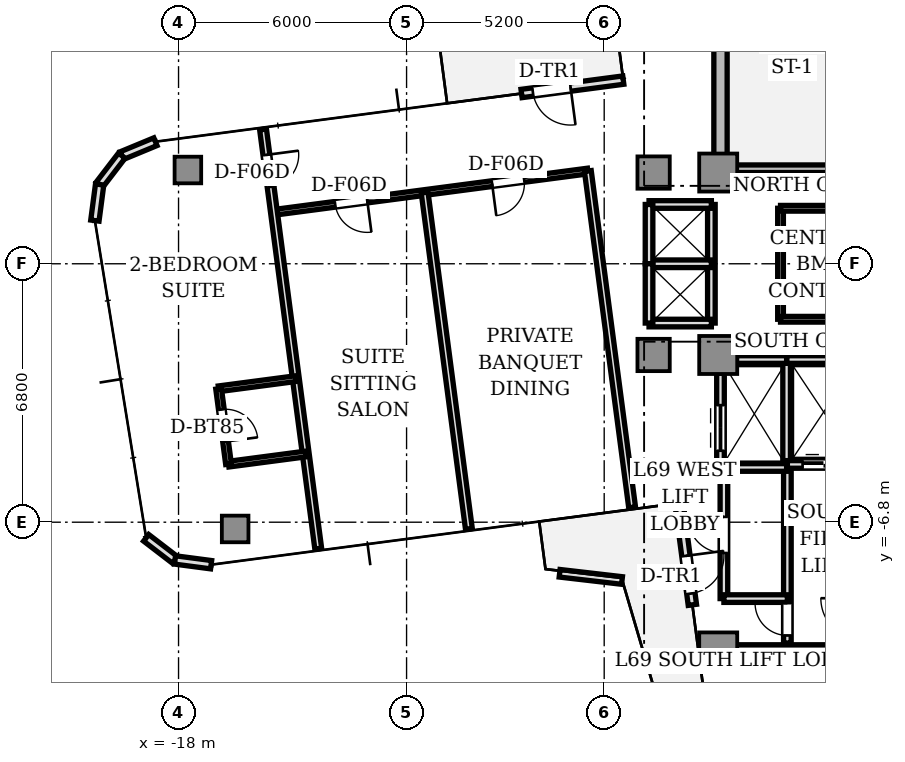
"""IFC4 building model, lengths in metres.
Left out: names, types, materials, properties, quantities, classifications, styles, units other than length and angle.
Written with IfcOpenShell. Run it as: python <this file> out.ifc"""

import sys

from ifc_helpers import new_model, si_unit, direction, frame, frame_2d, origin, origin_2d, place, context, subcontext, project, spatial, rectangle, extrude, source, transform, mapped, element, fill, save


model = new_model("IFC4")
c1 = context("Model", 3, precision=1e-05, world=origin(), true_north=direction((0.0, 1.0)))
c2 = subcontext(c1, "Body", "Model", "MODEL_VIEW")
j1 = project(units=[si_unit("LENGTHUNIT", "METRE"), si_unit("PLANEANGLEUNIT", "RADIAN")], contexts=[c1])
p1 = place(None, origin())
s1 = spatial("IfcSite", under=j1, at=p1, CompositionType="ELEMENT")
p2 = place(p1, origin())
s2 = spatial("IfcBuilding", under=s1, at=p2, CompositionType="ELEMENT")
p3 = place(p2, frame((0.0, 0.0, 247.85)))
s3 = spatial("IfcBuildingStorey", under=s2, at=p3, CompositionType="ELEMENT", Elevation=247.85)
p4 = place(p3, frame((-3.74, 2.85, 0.0), z_axis=(0.0, 0.0, 1.0), x_axis=(0.0, 1.0, 0.0)))
e1 = element("IfcWall", 1, at=p4, inside=s3, PredefinedType="SHEAR", context=c2, shape_type="SweptSolid", body=[
    extrude(rectangle(XDim=6.9, YDim=0.35, at=frame_2d((3.45, 0.0))), origin(), (0.0, 0.0, 1.0), 3.11),
])
p5 = place(p3, frame((-3.55, -10.2, 0.0), z_axis=(0.0, 0.0, 1.0), x_axis=(1.0, 0.0, 0.0)))
e2 = element("IfcWall", 2, at=p5, inside=s3, PredefinedType="SHEAR", context=c2, shape_type="SweptSolid", body=[
    extrude(rectangle(XDim=7.1, YDim=0.35, at=frame_2d((3.55, 0.0))), origin(), (0.0, 0.0, 1.0), 3.11),
])
m1 = source(origin(), c2, "Body", "SweptSolid", [
    extrude(rectangle(XDim=1.0, YDim=1.0, at=origin_2d()), origin(), (0.0, 0.0, 1.0), 3.11),
])
for number, where, z_axis, x_axis in (
    (3, (-3.8, 2.4, 0.0), (0.0, 0.0, 1.0), (1.0, 0.0, 0.0)),
    (4, (-3.8, -2.4, 0.0), (0.0, 0.0, 1.0), (1.0, 0.0, 0.0)),
    (5, (-3.8, -10.2, 0.0), (0.0, 0.0, 1.0), (1.0, 0.0, 0.0)),
):
    element("IfcColumn", number, at=place(p3, frame(where, z_axis=z_axis, x_axis=x_axis)), inside=s3, PredefinedType="COLUMN", context=c2, shape_type="MappedRepresentation", body=[
        mapped(m1, transform((0.0, 0.0, 0.0), scale=1.0)),
    ])
m2 = source(origin(), c2, "Body", "SweptSolid", [
    extrude(rectangle(XDim=0.85, YDim=0.85, at=origin_2d()), origin(), (0.0, 0.0, 1.0), 3.11),
])
for number, where, z_axis, x_axis in (
    (6, (-5.5, 2.4, 0.0), (0.0, 0.0, 1.0), (1.0, 0.0, 0.0)),
    (7, (-5.5, -2.4, 0.0), (0.0, 0.0, 1.0), (1.0, 0.0, 0.0)),
):
    element("IfcColumn", number, at=place(p3, frame(where, z_axis=z_axis, x_axis=x_axis)), inside=s3, PredefinedType="COLUMN", context=c2, shape_type="MappedRepresentation", body=[
        mapped(m2, transform((0.0, 0.0, 0.0), scale=1.0)),
    ])
m3 = source(origin(), c2, "Body", "SweptSolid", [
    extrude(rectangle(XDim=0.7, YDim=0.7, at=origin_2d()), origin(), (0.0, 0.0, 1.0), 3.11),
])
for number, where, z_axis, x_axis in (
    (8, (-17.754, 2.467, 0.0), (0.0, 0.0, 1.0), (1.0, 0.0, 0.0)),
    (9, (-16.51, -6.978, 0.0), (0.0, 0.0, 1.0), (1.0, 0.0, 0.0)),
):
    element("IfcColumn", number, at=place(p3, frame(where, z_axis=z_axis, x_axis=x_axis)), inside=s3, PredefinedType="COLUMN", context=c2, shape_type="MappedRepresentation", body=[
        mapped(m3, transform((0.0, 0.0, 0.0), scale=1.0)),
    ])
p6 = place(p3, frame((-6.298, 4.832, 0.0), z_axis=(0.0, 0.0, 1.0), x_axis=(-0.991451525486, -0.130475563272, 0.0)))
e10 = element("IfcWall", 10, at=p6, inside=s3, PredefinedType="STANDARD", context=c2, shape_type="SweptSolid", body=[
    extrude(rectangle(XDim=2.7, YDim=0.22, at=frame_2d((1.35, 0.0))), origin(), (0.0, 0.0, 1.0), 3.11),
])
p7 = place(p6, frame((1.4, 0.0, 0.0)))
e11 = element("IfcOpeningElement", 11, at=p7, cuts=e10, PredefinedType="OPENING", context=c2, shape_type="SweptSolid", body=[
    extrude(rectangle(XDim=1.0, YDim=2.2, at=frame_2d((0.5, 1.1))), frame((0.0, 0.12, 0.0), z_axis=(0.0, -1.0, 0.0), x_axis=(1.0, 0.0, 0.0)), (0.0, 0.0, 1.0), 0.24),
])
for number, where, z_axis, x_axis in (
    (12, (-18.608, 3.212, 0.0), (0.0, 0.0, 1.0), (-0.924, -0.383, 0.0)),
    (13, (-19.493, 2.845, 0.0), (0.0, 0.0, 1.0), (-0.609, -0.793, 0.0)),
    (14, (-20.076, 2.085, 0.0), (0.0, 0.0, 1.0), (-0.131, -0.991, 0.0)),
    (15, (-18.852, -7.21, 0.0), (0.0, 0.0, 1.0), (0.793, -0.609, 0.0)),
    (16, (-18.093, -7.793, 0.0), (0.0, 0.0, 1.0), (0.991, -0.131, 0.0)),
):
    element("IfcWall", number, at=place(p3, frame(where, z_axis=z_axis, x_axis=x_axis)), inside=s3, PredefinedType="STANDARD", context=c2, shape_type="SweptSolid", body=[
        extrude(rectangle(XDim=0.958, YDim=0.22, at=frame_2d((0.479, 0.0))), origin(), (0.0, 0.0, 1.0), 3.11),
    ])
p8 = place(p3, frame((-4.832, -6.298, 0.0), z_axis=(0.0, 0.0, 1.0), x_axis=(0.130475563272, -0.991451525486, 0.0)))
e17 = element("IfcWall", 17, at=p8, inside=s3, PredefinedType="STANDARD", context=c2, shape_type="SweptSolid", body=[
    extrude(rectangle(XDim=2.7, YDim=0.22, at=frame_2d((1.35, 0.0))), origin(), (0.0, 0.0, 1.0), 3.11),
])
p9 = place(p8, frame((1.4, 0.0, 0.0)))
e18 = element("IfcOpeningElement", 18, at=p9, cuts=e17, PredefinedType="OPENING", context=c2, shape_type="SweptSolid", body=[
    extrude(rectangle(XDim=1.0, YDim=2.2, at=frame_2d((0.5, 1.1))), frame((0.0, 0.12, 0.0), z_axis=(0.0, -1.0, 0.0), x_axis=(1.0, 0.0, 0.0)), (0.0, 0.0, 1.0), 0.24),
])
p10 = place(p3, frame((-7.973, -8.144, 0.0), z_axis=(0.0, 0.0, 1.0), x_axis=(0.993336913932, -0.115246585284, 0.0)))
e19 = element("IfcWall", 19, at=p10, inside=s3, PredefinedType="PARAPET", context=c2, shape_type="SweptSolid", body=[
    extrude(rectangle(XDim=1.652, YDim=0.2, at=frame_2d((0.826, 0.0))), origin(), (0.0, 0.0, 1.0), 0.65),
])
p11 = place(p3, frame((-3.72, 2.5, 0.0), z_axis=(0.0, 0.0, 1.0), x_axis=(1.0, 0.0, 0.0)))
e20 = element("IfcWall", 20, at=p11, inside=s3, PredefinedType="SOLIDWALL", context=c2, shape_type="SweptSolid", body=[
    extrude(rectangle(XDim=3.72, YDim=0.2, at=frame_2d((1.86, 0.0))), origin(), (0.0, 0.0, 1.0), 3.11),
])
p12 = place(p3, frame((-1.98, -9.98, 0.0), z_axis=(0.0, 0.0, 1.0), x_axis=(0.0, 1.0, 0.0)))
e21 = element("IfcWall", 21, at=p12, inside=s3, PredefinedType="SOLIDWALL", context=c2, shape_type="SweptSolid", body=[
    extrude(rectangle(XDim=4.66, YDim=0.2, at=frame_2d((2.33, 0.0))), origin(), (0.0, 0.0, 1.0), 2.66),
])
p13 = place(p12, frame((0.2, 0.0, 0.0)))
e22 = element("IfcOpeningElement", 22, at=p13, cuts=e21, PredefinedType="OPENING", context=c2, shape_type="SweptSolid", body=[
    extrude(rectangle(XDim=0.85, YDim=2.1, at=frame_2d((0.425, 1.05))), frame((0.0, 0.11, 0.0), z_axis=(0.0, -1.0, 0.0), x_axis=(1.0, 0.0, 0.0)), (0.0, 0.0, 1.0), 0.22),
])
p14 = place(p3, frame((-2.0, -5.28, 0.0), z_axis=(0.0, 0.0, 1.0), x_axis=(0.0, 1.0, 0.0)))
e23 = element("IfcWall", 23, at=p14, inside=s3, PredefinedType="SOLIDWALL", context=c2, shape_type="SweptSolid", body=[
    extrude(rectangle(XDim=2.78, YDim=0.2, at=frame_2d((1.39, 0.0))), origin(), (0.0, 0.0, 1.0), 2.66),
])
p15 = place(p3, frame((-2.0, -2.52, 0.0), z_axis=(0.0, 0.0, 1.0), x_axis=(1.0, 0.0, 0.0)))
e24 = element("IfcWall", 24, at=p15, inside=s3, PredefinedType="SOLIDWALL", context=c2, shape_type="SweptSolid", body=[
    extrude(rectangle(XDim=1.95, YDim=0.2, at=frame_2d((0.975, 0.0))), origin(), (0.0, 0.0, 1.0), 2.66),
])
p16 = place(p3, frame((-1.98, -5.28, 0.0), z_axis=(0.0, 0.0, 1.0), x_axis=(1.0, 0.0, 0.0)))
e25 = element("IfcWall", 25, at=p16, inside=s3, PredefinedType="SOLIDWALL", context=c2, shape_type="SweptSolid", body=[
    extrude(rectangle(XDim=1.93, YDim=0.2, at=frame_2d((0.965, 0.0))), origin(), (0.0, 0.0, 1.0), 2.66),
])
p17 = place(p16, frame((0.4, 0.0, 0.0)))
e26 = element("IfcOpeningElement", 26, at=p17, cuts=e25, PredefinedType="OPENING", context=c2, shape_type="SweptSolid", body=[
    extrude(rectangle(XDim=1.1, YDim=2.2, at=frame_2d((0.55, 1.1))), frame((0.0, 0.11, 0.0), z_axis=(0.0, -1.0, 0.0), x_axis=(1.0, 0.0, 0.0)), (0.0, 0.0, 1.0), 0.22),
])
p18 = place(p3, frame((-3.32, -2.52, 0.0), z_axis=(0.0, 0.0, 1.0), x_axis=(1.0, 0.0, 0.0)))
e27 = element("IfcWall", 27, at=p18, inside=s3, PredefinedType="SOLIDWALL", context=c2, shape_type="SweptSolid", body=[
    extrude(rectangle(XDim=1.32, YDim=0.2, at=frame_2d((0.66, 0.0))), origin(), (0.0, 0.0, 1.0), 2.66),
])
p19 = place(p3, frame((-3.74, -5.36, 0.0), z_axis=(0.0, 0.0, 1.0), x_axis=(1.0, 0.0, 0.0)))
e28 = element("IfcWall", 28, at=p19, inside=s3, PredefinedType="SOLIDWALL", context=c2, shape_type="SweptSolid", body=[
    extrude(rectangle(XDim=1.74, YDim=0.2, at=frame_2d((0.87, 0.0))), origin(), (0.0, 0.0, 1.0), 2.66),
])
p20 = place(p3, frame((-3.74, -5.36, 0.0), z_axis=(0.0, 0.0, 1.0), x_axis=(0.0, 1.0, 0.0)))
e29 = element("IfcWall", 29, at=p20, inside=s3, PredefinedType="SOLIDWALL", context=c2, shape_type="SweptSolid", body=[
    extrude(rectangle(XDim=2.48, YDim=0.2, at=frame_2d((1.24, 0.0))), origin(), (0.0, 0.0, 1.0), 2.66),
])
p21 = place(p20, frame((0.44, 0.0, 0.0)))
e30 = element("IfcOpeningElement", 30, at=p21, cuts=e29, PredefinedType="OPENING", context=c2, shape_type="SweptSolid", body=[
    extrude(rectangle(XDim=1.2, YDim=2.2, at=frame_2d((0.6, 1.1))), frame((0.0, 0.11, 0.0), z_axis=(0.0, -1.0, 0.0), x_axis=(1.0, 0.0, 0.0)), (0.0, 0.0, 1.0), 0.22),
])
p22 = place(p3, frame((-3.98, -1.56, 0.0), z_axis=(0.0, 0.0, 1.0), x_axis=(0.0, 1.0, 0.0)))
e31 = element("IfcWall", 31, at=p22, inside=s3, PredefinedType="SOLIDWALL", context=c2, shape_type="SweptSolid", body=[
    extrude(rectangle(XDim=3.12, YDim=0.2, at=frame_2d((1.56, 0.0))), origin(), (0.0, 0.0, 1.0), 2.33),
])
for number, where, z_axis, x_axis in (
    (32, (-5.62, 1.56, 0.0), (0.0, 0.0, 1.0), (1.0, 0.0, 0.0)),
    (33, (-5.62, -1.56, 0.0), (0.0, 0.0, 1.0), (1.0, 0.0, 0.0)),
    (34, (-5.62, 0.0, 0.0), (0.0, 0.0, 1.0), (1.0, 0.0, 0.0)),
):
    element("IfcWall", number, at=place(p3, frame(where, z_axis=z_axis, x_axis=x_axis)), inside=s3, PredefinedType="SOLIDWALL", context=c2, shape_type="SweptSolid", body=[
        extrude(rectangle(XDim=1.64, YDim=0.2, at=frame_2d((0.82, 0.0))), origin(), (0.0, 0.0, 1.0), 2.66),
    ])
for number, where, z_axis, x_axis in (
    (35, (-5.62, 0.0, 0.0), (0.0, 0.0, 1.0), (0.0, 1.0, 0.0)),
    (36, (-5.62, -1.56, 0.0), (0.0, 0.0, 1.0), (0.0, 1.0, 0.0)),
):
    element("IfcWall", number, at=place(p3, frame(where, z_axis=z_axis, x_axis=x_axis)), inside=s3, PredefinedType="SOLIDWALL", context=c2, shape_type="SweptSolid", body=[
        extrude(rectangle(XDim=1.56, YDim=0.2, at=frame_2d((0.78, 0.0))), origin(), (0.0, 0.0, 1.0), 2.66),
    ])
p23 = place(p3, frame((-3.65, -8.81, 0.0), z_axis=(0.0, 0.0, 1.0), x_axis=(0.0, 1.0, 0.0)))
e37 = element("IfcWall", 37, at=p23, inside=s3, PredefinedType="SOLIDWALL", context=c2, shape_type="SweptSolid", body=[
    extrude(rectangle(XDim=3.43, YDim=0.2, at=frame_2d((1.715, 0.0))), origin(), (0.0, 0.0, 1.0), 2.66),
])
p24 = place(p23, frame((1.2, 0.0, 0.0)))
e38 = element("IfcOpeningElement", 38, at=p24, cuts=e37, PredefinedType="OPENING", context=c2, shape_type="SweptSolid", body=[
    extrude(rectangle(XDim=0.95, YDim=2.15, at=frame_2d((0.475, 1.075))), frame((0.0, 0.11, 0.0), z_axis=(0.0, -1.0, 0.0), x_axis=(1.0, 0.0, 0.0)), (0.0, 0.0, 1.0), 0.22),
])
p25 = place(p3, frame((-3.65, -8.81, 0.0), z_axis=(0.0, 0.0, 1.0), x_axis=(1.0, 0.0, 0.0)))
e39 = element("IfcWall", 39, at=p25, inside=s3, PredefinedType="SOLIDWALL", context=c2, shape_type="SweptSolid", body=[
    extrude(rectangle(XDim=1.67, YDim=0.2, at=frame_2d((0.835, 0.0))), origin(), (0.0, 0.0, 1.0), 2.66),
])
p26 = place(p3, frame((-2.16, -1.46, 0.0), z_axis=(0.0, 0.0, 1.0), x_axis=(0.0, 1.0, 0.0)))
e40 = element("IfcWall", 40, at=p26, inside=s3, PredefinedType="PARTITIONING", context=c2, shape_type="SweptSolid", body=[
    extrude(rectangle(XDim=2.92, YDim=0.15, at=frame_2d((1.46, 0.0))), origin(), (0.0, 0.0, 1.0), 2.66),
])
p27 = place(p3, frame((-2.16, 1.46, 0.0), z_axis=(0.0, 0.0, 1.0), x_axis=(1.0, 0.0, 0.0)))
e41 = element("IfcWall", 41, at=p27, inside=s3, PredefinedType="PARTITIONING", context=c2, shape_type="SweptSolid", body=[
    extrude(rectangle(XDim=4.32, YDim=0.15, at=frame_2d((2.16, 0.0))), origin(), (0.0, 0.0, 1.0), 2.66),
])
p28 = place(p27, frame((1.73, 0.0, 0.0)))
e42 = element("IfcOpeningElement", 42, at=p28, cuts=e41, PredefinedType="OPENING", context=c2, shape_type="SweptSolid", body=[
    extrude(rectangle(XDim=0.85, YDim=2.1, at=frame_2d((0.425, 1.05))), frame((0.0, 0.085, 0.0), z_axis=(0.0, -1.0, 0.0), x_axis=(1.0, 0.0, 0.0)), (0.0, 0.0, 1.0), 0.17),
])
p29 = place(p3, frame((-2.16, -1.46, 0.0), z_axis=(0.0, 0.0, 1.0), x_axis=(1.0, 0.0, 0.0)))
e43 = element("IfcWall", 43, at=p29, inside=s3, PredefinedType="PARTITIONING", context=c2, shape_type="SweptSolid", body=[
    extrude(rectangle(XDim=4.32, YDim=0.15, at=frame_2d((2.16, 0.0))), origin(), (0.0, 0.0, 1.0), 2.66),
])
p30 = place(p29, frame((1.73, 0.0, 0.0)))
e44 = element("IfcOpeningElement", 44, at=p30, cuts=e43, PredefinedType="OPENING", context=c2, shape_type="SweptSolid", body=[
    extrude(rectangle(XDim=0.85, YDim=2.1, at=frame_2d((0.425, 1.05))), frame((0.0, 0.085, 0.0), z_axis=(0.0, -1.0, 0.0), x_axis=(1.0, 0.0, 0.0)), (0.0, 0.0, 1.0), 0.17),
])
for number, where, z_axis, x_axis in (
    (45, (-2.16, 0.66, 0.0), (0.0, 0.0, 1.0), (1.0, 0.0, 0.0)),
    (46, (-2.16, -0.66, 0.0), (0.0, 0.0, 1.0), (1.0, 0.0, 0.0)),
):
    element("IfcWall", number, at=place(p3, frame(where, z_axis=z_axis, x_axis=x_axis)), inside=s3, PredefinedType="PARTITIONING", context=c2, shape_type="SweptSolid", body=[
        extrude(rectangle(XDim=4.32, YDim=0.15, at=frame_2d((2.16, 0.0))), origin(), (0.0, 0.0, 1.0), 2.66),
    ])
p31 = place(p3, frame((-7.23, 2.44, 0.0), z_axis=(0.0, 0.0, 1.0), x_axis=(-0.991442619765, -0.130543217797, 0.0)))
e47 = element("IfcWall", 47, at=p31, inside=s3, PredefinedType="PARTITIONING", context=c2, shape_type="SweptSolid", body=[
    extrude(rectangle(XDim=8.33, YDim=0.15, at=frame_2d((4.165, 0.0))), origin(), (0.0, 0.0, 1.0), 2.66),
])
p32 = place(p31, frame((1.691, 0.0, 0.0)))
e48 = element("IfcOpeningElement", 48, at=p32, cuts=e47, PredefinedType="OPENING", context=c2, shape_type="SweptSolid", body=[
    extrude(rectangle(XDim=0.85, YDim=2.1, at=frame_2d((0.425, 1.05))), frame((0.0, 0.085, 0.0), z_axis=(0.0, -1.0, 0.0), x_axis=(1.0, 0.0, 0.0)), (0.0, 0.0, 1.0), 0.17),
])
p33 = place(p31, frame((5.856, 0.0, 0.0)))
e49 = element("IfcOpeningElement", 49, at=p33, cuts=e47, PredefinedType="OPENING", context=c2, shape_type="SweptSolid", body=[
    extrude(rectangle(XDim=0.85, YDim=2.1, at=frame_2d((0.425, 1.05))), frame((0.0, 0.085, 0.0), z_axis=(0.0, -1.0, 0.0), x_axis=(1.0, 0.0, 0.0)), (0.0, 0.0, 1.0), 0.17),
])
p34 = place(p3, frame((-7.23, 2.44, 0.0), z_axis=(0.0, 0.0, 1.0), x_axis=(0.130549321022, -0.991441816135, 0.0)))
e50 = element("IfcWall", 50, at=p34, inside=s3, PredefinedType="PARTITIONING", context=c2, shape_type="SweptSolid", body=[
    extrude(rectangle(XDim=8.926, YDim=0.18, at=frame_2d((4.463, 0.0))), origin(), (0.0, 0.0, 1.0), 2.66),
])
p35 = place(p3, frame((-11.525, 1.875, 0.0), z_axis=(0.0, 0.0, 1.0), x_axis=(0.13054578094, -0.991442282273, 0.0)))
e51 = element("IfcWall", 51, at=p35, inside=s3, PredefinedType="PARTITIONING", context=c2, shape_type="SweptSolid", body=[
    extrude(rectangle(XDim=8.926, YDim=0.18, at=frame_2d((4.463, 0.0))), origin(), (0.0, 0.0, 1.0), 2.66),
])
p36 = place(p3, frame((-15.776, 3.534, 0.0), z_axis=(0.0, 0.0, 1.0), x_axis=(0.130540791586, -0.991442939221, 0.0)))
e52 = element("IfcWall", 52, at=p36, inside=s3, PredefinedType="PARTITIONING", context=c2, shape_type="SweptSolid", body=[
    extrude(rectangle(XDim=11.126, YDim=0.18, at=frame_2d((5.563, 0.0))), origin(), (0.0, 0.0, 1.0), 2.66),
])
p37 = place(p36, frame((0.675, 0.0, 0.0)))
e53 = element("IfcOpeningElement", 53, at=p37, cuts=e52, PredefinedType="OPENING", context=c2, shape_type="SweptSolid", body=[
    extrude(rectangle(XDim=0.85, YDim=2.1, at=frame_2d((0.425, 1.05))), frame((0.0, 0.1, 0.0), z_axis=(0.0, -1.0, 0.0), x_axis=(1.0, 0.0, 0.0)), (0.0, 0.0, 1.0), 0.2),
])
for number, where, z_axis, x_axis in (
    (54, (-14.652, -5.005, 0.0), (0.0, 0.0, 1.0), (-0.991, -0.131, 0.0)),
    (55, (-14.913, -3.022, 0.0), (0.0, 0.0, 1.0), (-0.991, -0.131, 0.0)),
):
    element("IfcWall", number, at=place(p3, frame(where, z_axis=z_axis, x_axis=x_axis)), inside=s3, PredefinedType="PARTITIONING", context=c2, shape_type="SweptSolid", body=[
        extrude(rectangle(XDim=2.05, YDim=0.15, at=frame_2d((1.025, 0.0))), origin(), (0.0, 0.0, 1.0), 2.66),
    ])
p38 = place(p3, frame((-16.946, -3.29, 0.0), z_axis=(0.0, 0.0, 1.0), x_axis=(0.130492404742, -0.991449308994, 0.0)))
e56 = element("IfcWall", 56, at=p38, inside=s3, PredefinedType="PARTITIONING", context=c2, shape_type="SweptSolid", body=[
    extrude(rectangle(XDim=2.0, YDim=0.15, at=frame_2d((1.0, 0.0))), origin(), (0.0, 0.0, 1.0), 2.63),
])
p39 = place(p38, frame((0.55, 0.0, 0.0)))
e57 = element("IfcOpeningElement", 57, at=p39, cuts=e56, PredefinedType="OPENING", context=c2, shape_type="SweptSolid", body=[
    extrude(rectangle(XDim=0.85, YDim=2.1, at=frame_2d((0.425, 1.05))), frame((0.0, 0.085, 0.0), z_axis=(0.0, -1.0, 0.0), x_axis=(1.0, 0.0, 0.0)), (0.0, 0.0, 1.0), 0.17),
])
m4 = source(origin(), c2, "Body", "SweptSolid", [
    extrude(rectangle(XDim=1.0, YDim=0.05, at=origin_2d()), origin(), (0.0, 0.0, 1.0), 2.2),
])
p40 = place(p7, frame((0.5, 0.0, 0.0)))
e58 = element("IfcDoor", 58, at=p40, inside=s3, OperationType="SINGLE_SWING_LEFT", PredefinedType="DOOR", context=c2, shape_type="MappedRepresentation", body=[
    mapped(m4, transform((0.0, 0.0, 0.0), scale=1.0)),
])
fill(e11, e58)
p41 = place(p9, frame((0.5, 0.0, 0.0)))
e59 = element("IfcDoor", 59, at=p41, inside=s3, OperationType="SINGLE_SWING_LEFT", PredefinedType="DOOR", context=c2, shape_type="MappedRepresentation", body=[
    mapped(m4, transform((0.0, 0.0, 0.0), scale=1.0)),
])
fill(e18, e59)
m5 = source(origin(), c2, "Body", "SweptSolid", [
    extrude(rectangle(XDim=0.85, YDim=0.05, at=origin_2d()), origin(), (0.0, 0.0, 1.0), 2.1),
])
p42 = place(p13, frame((0.425, 0.0, 0.0)))
e60 = element("IfcDoor", 60, at=p42, inside=s3, OperationType="SINGLE_SWING_RIGHT", PredefinedType="DOOR", context=c2, shape_type="MappedRepresentation", body=[
    mapped(m5, transform((0.0, 0.0, 0.0), scale=1.0)),
])
fill(e22, e60)
m6 = source(origin(), c2, "Body", "SweptSolid", [
    extrude(rectangle(XDim=1.1, YDim=0.05, at=origin_2d()), origin(), (0.0, 0.0, 1.0), 2.2),
])
p43 = place(p17, frame((0.55, 0.0, 0.0)))
e61 = element("IfcDoor", 61, at=p43, inside=s3, OperationType="DOUBLE_DOOR_SLIDING", PredefinedType="DOOR", context=c2, shape_type="MappedRepresentation", body=[
    mapped(m6, transform((0.0, 0.0, 0.0), scale=1.0)),
])
fill(e26, e61)
m7 = source(origin(), c2, "Body", "SweptSolid", [
    extrude(rectangle(XDim=1.2, YDim=0.05, at=origin_2d()), origin(), (0.0, 0.0, 1.0), 2.2),
])
p44 = place(p21, frame((0.6, 0.0, 0.0)))
e62 = element("IfcDoor", 62, at=p44, inside=s3, OperationType="DOUBLE_DOOR_SLIDING", PredefinedType="DOOR", context=c2, shape_type="MappedRepresentation", body=[
    mapped(m7, transform((0.0, 0.0, 0.0), scale=1.0)),
])
fill(e30, e62)
m8 = source(origin(), c2, "Body", "SweptSolid", [
    extrude(rectangle(XDim=0.95, YDim=0.05, at=origin_2d()), origin(), (0.0, 0.0, 1.0), 2.15),
])
p45 = place(p24, frame((0.475, 0.0, 0.0)))
e63 = element("IfcDoor", 63, at=p45, inside=s3, OperationType="SINGLE_SWING_RIGHT", PredefinedType="DOOR", context=c2, shape_type="MappedRepresentation", body=[
    mapped(m8, transform((0.0, 0.0, 0.0), scale=1.0)),
])
fill(e38, e63)
p46 = place(p32, frame((0.425, 0.0, 0.0)))
e64 = element("IfcDoor", 64, at=p46, inside=s3, OperationType="SINGLE_SWING_RIGHT", PredefinedType="DOOR", context=c2, shape_type="MappedRepresentation", body=[
    mapped(m5, transform((0.0, 0.0, 0.0), scale=1.0)),
])
fill(e48, e64)
p47 = place(p33, frame((0.425, 0.0, 0.0)))
e65 = element("IfcDoor", 65, at=p47, inside=s3, OperationType="SINGLE_SWING_LEFT", PredefinedType="DOOR", context=c2, shape_type="MappedRepresentation", body=[
    mapped(m5, transform((0.0, 0.0, 0.0), scale=1.0)),
])
fill(e49, e65)
p48 = place(p39, frame((0.425, 0.0, 0.0)))
e66 = element("IfcDoor", 66, at=p48, inside=s3, OperationType="SINGLE_SWING_RIGHT", PredefinedType="DOOR", context=c2, shape_type="MappedRepresentation", body=[
    mapped(m5, transform((0.0, 0.0, 0.0), scale=1.0)),
])
fill(e57, e66)
p49 = place(p37, frame((0.425, 0.0, 0.0)))
e67 = element("IfcDoor", 67, at=p49, inside=s3, OperationType="SINGLE_SWING_LEFT", PredefinedType="DOOR", context=c2, shape_type="MappedRepresentation", body=[
    mapped(m5, transform((0.0, 0.0, 0.0), scale=1.0)),
])
fill(e53, e67)
save(model, sys.argv[1])
